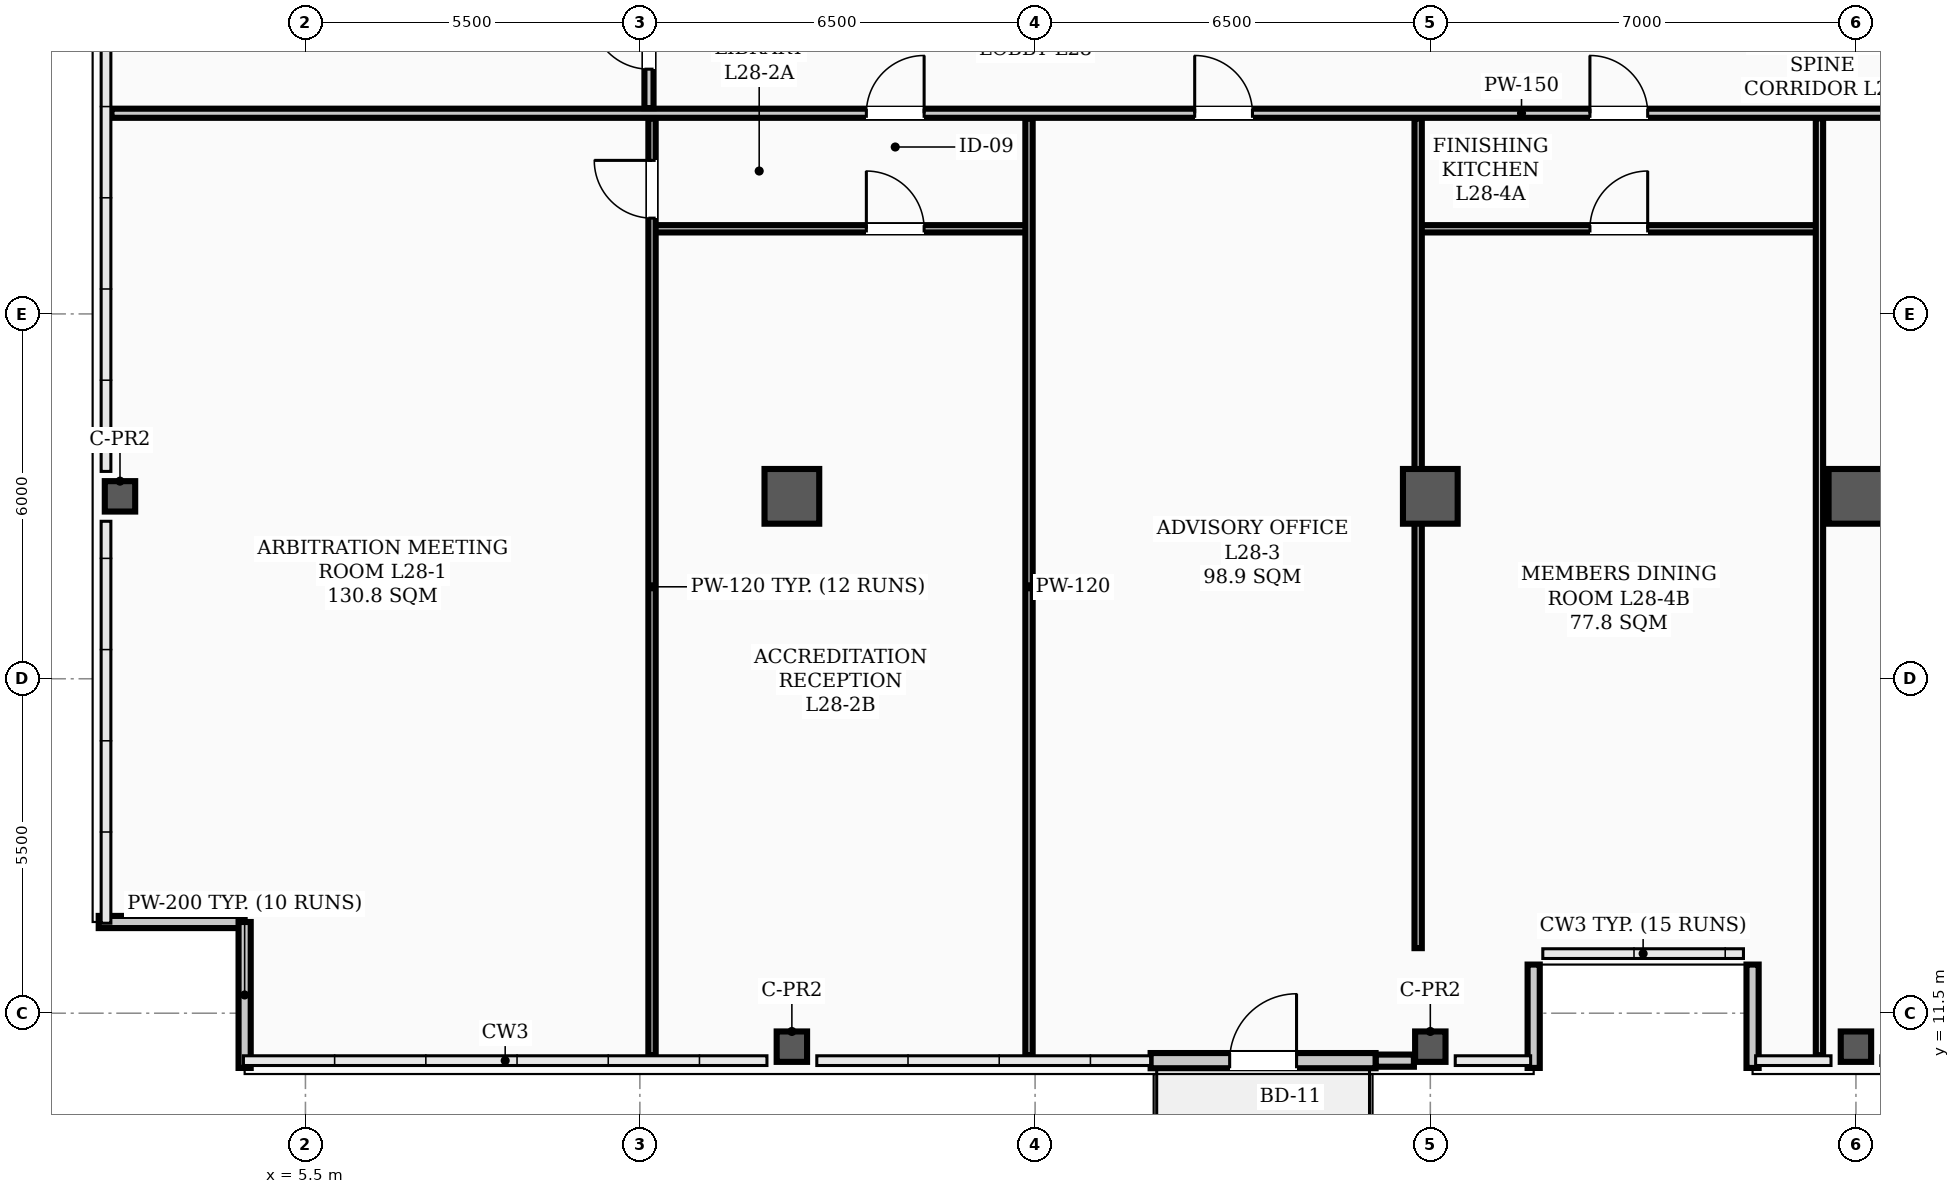
"""IFC4 building model, lengths in metres.
Left out: names, types, materials, properties, quantities, classifications, styles, units other than length and angle.
Written with IfcOpenShell. Run it as: python <this file> out.ifc"""

import sys

from ifc_helpers import new_model, si_unit, direction, frame, frame_2d, origin, origin_2d, place, context, subcontext, project, spatial, rectangle, hollow_rectangle, extrude, element, fill, save


model = new_model("IFC4")
c1 = context("Model", 3, precision=1e-05, world=origin(), true_north=direction((0.0, 1.0)))
c2 = subcontext(c1, "Body", "Model", "MODEL_VIEW")
j1 = project(units=[si_unit("LENGTHUNIT", "METRE"), si_unit("PLANEANGLEUNIT", "RADIAN")], contexts=[c1])
p1 = place(None, origin())
s1 = spatial("IfcSite", under=j1, at=p1, CompositionType="ELEMENT")
p2 = place(p1, origin())
s2 = spatial("IfcBuilding", under=s1, at=p2, CompositionType="ELEMENT")
p3 = place(p2, frame((0.0, 0.0, 114.9)))
s3 = spatial("IfcBuildingStorey", under=s2, at=p3, CompositionType="ELEMENT", Elevation=114.9)
for number, where, z_axis, x_axis in (
    (1, (13.5, 20.0, 0.0), (0.0, 0.0, 1.0), (1.0, 0.0, 0.0)),
    (2, (24.0, 20.0, 0.0), (0.0, 0.0, 1.0), (1.0, 0.0, 0.0)),
    (3, (31.0, 20.0, 0.0), (0.0, 0.0, 1.0), (1.0, 0.0, 0.0)),
):
    element("IfcColumn", number, at=place(p3, frame(where, z_axis=z_axis, x_axis=x_axis)), inside=s3, PredefinedType="COLUMN", context=c2, shape_type="SweptSolid", body=[
        extrude(hollow_rectangle(XDim=0.9, YDim=0.9, WallThickness=0.035, InnerFilletRadius=0.017, OuterFilletRadius=0.052, at=origin_2d()), origin(), (0.0, 0.0, 1.0), 3.9),
    ])
for number, where, z_axis, x_axis in (
    (4, (2.45, 20.0, 0.0), (0.0, 0.0, 1.0), (1.0, 0.0, 0.0)),
    (5, (13.5, 10.95, 0.0), (0.0, 0.0, 1.0), (1.0, 0.0, 0.0)),
    (6, (24.0, 10.95, 0.0), (0.0, 0.0, 1.0), (1.0, 0.0, 0.0)),
    (7, (31.0, 10.95, 0.0), (0.0, 0.0, 1.0), (1.0, 0.0, 0.0)),
):
    element("IfcColumn", number, at=place(p3, frame(where, z_axis=z_axis, x_axis=x_axis)), inside=s3, PredefinedType="COLUMN", context=c2, shape_type="SweptSolid", body=[
        extrude(hollow_rectangle(XDim=0.5, YDim=0.5, WallThickness=0.024, InnerFilletRadius=0.012, OuterFilletRadius=0.036, at=origin_2d()), origin(), (0.0, 0.0, 1.0), 3.9),
    ])
p4 = place(p3, frame((23.1, 10.72, 0.0), z_axis=(0.0, 0.0, 1.0), x_axis=(1.0, 0.0, 0.0)))
e8 = element("IfcWall", 8, at=p4, inside=s3, PredefinedType="PARAPET", context=c2, shape_type="SweptSolid", body=[
    extrude(rectangle(XDim=0.63, YDim=0.2, at=frame_2d((0.315, 0.0))), origin(), (0.0, 0.0, 1.0), 1.2),
])
for number, where, z_axis, x_axis in (
    (9, (2.1, 13.0, 0.0), (0.0, 0.0, 1.0), (1.0, 0.0, 0.0)),
    (10, (4.5, 13.0, 0.0), (0.0, 0.0, 1.0), (0.0, -1.0, 0.0)),
):
    element("IfcWall", number, at=place(p3, frame(where, z_axis=z_axis, x_axis=x_axis)), inside=s3, PredefinedType="PARAPET", context=c2, shape_type="SweptSolid", body=[
        extrude(rectangle(XDim=2.4, YDim=0.2, at=frame_2d((1.2, 0.0))), origin(), (0.0, 0.0, 1.0), 1.2),
    ])
for number, where, z_axis, x_axis in (
    (11, (25.7, 10.6, 0.0), (0.0, 0.0, 1.0), (0.0, 1.0, 0.0)),
    (12, (29.3, 12.3, 0.0), (0.0, 0.0, 1.0), (0.0, -1.0, 0.0)),
):
    element("IfcWall", number, at=place(p3, frame(where, z_axis=z_axis, x_axis=x_axis)), inside=s3, PredefinedType="PARAPET", context=c2, shape_type="SweptSolid", body=[
        extrude(rectangle(XDim=1.7, YDim=0.2, at=frame_2d((0.85, 0.0))), origin(), (0.0, 0.0, 1.0), 1.2),
    ])
p5 = place(p3, frame((19.4, 10.72, 0.0), z_axis=(0.0, 0.0, 1.0), x_axis=(1.0, 0.0, 0.0)))
e13 = element("IfcWall", 13, at=p5, inside=s3, PredefinedType="STANDARD", context=c2, shape_type="SweptSolid", body=[
    extrude(rectangle(XDim=3.7, YDim=0.25, at=frame_2d((1.85, 0.0))), origin(), (0.0, 0.0, 1.0), 3.18),
])
p6 = place(p5, frame((1.3, 0.0, 0.0)))
e14 = element("IfcOpeningElement", 14, at=p6, cuts=e13, PredefinedType="OPENING", context=c2, shape_type="SweptSolid", body=[
    extrude(rectangle(XDim=1.1, YDim=2.2, at=frame_2d((0.55, 1.1))), frame((0.0, 0.135, 0.0), z_axis=(0.0, -1.0, 0.0), x_axis=(1.0, 0.0, 0.0)), (0.0, 0.0, 1.0), 0.27),
])
p7 = place(p3, frame((2.31, 26.3, 0.0), z_axis=(0.0, 0.0, 1.0), x_axis=(1.0, 0.0, 0.0)))
e15 = element("IfcWall", 15, at=p7, inside=s3, PredefinedType="PARTITIONING", context=c2, shape_type="SweptSolid", body=[
    extrude(rectangle(XDim=46.38, YDim=0.15, at=frame_2d((23.19, 0.0))), origin(), (0.0, 0.0, 1.0), 3.1),
])
p8 = place(p7, frame((12.415, 0.0, 0.0)))
e16 = element("IfcOpeningElement", 16, at=p8, cuts=e15, PredefinedType="OPENING", context=c2, shape_type="SweptSolid", body=[
    extrude(rectangle(XDim=0.95, YDim=2.08, at=frame_2d((0.475, 1.04))), frame((0.0, 0.085, 0.0), z_axis=(0.0, -1.0, 0.0), x_axis=(1.0, 0.0, 0.0)), (0.0, 0.0, 1.0), 0.17),
])
p9 = place(p7, frame((17.815, 0.0, 0.0)))
e17 = element("IfcOpeningElement", 17, at=p9, cuts=e15, PredefinedType="OPENING", context=c2, shape_type="SweptSolid", body=[
    extrude(rectangle(XDim=0.95, YDim=2.08, at=frame_2d((0.475, 1.04))), frame((0.0, 0.085, 0.0), z_axis=(0.0, -1.0, 0.0), x_axis=(1.0, 0.0, 0.0)), (0.0, 0.0, 1.0), 0.17),
])
p10 = place(p7, frame((24.315, 0.0, 0.0)))
e18 = element("IfcOpeningElement", 18, at=p10, cuts=e15, PredefinedType="OPENING", context=c2, shape_type="SweptSolid", body=[
    extrude(rectangle(XDim=0.95, YDim=2.08, at=frame_2d((0.475, 1.04))), frame((0.0, 0.085, 0.0), z_axis=(0.0, -1.0, 0.0), x_axis=(1.0, 0.0, 0.0)), (0.0, 0.0, 1.0), 0.17),
])
p11 = place(p7, frame((30.915, 0.0, 0.0)))
e19 = element("IfcOpeningElement", 19, at=p11, cuts=e15, PredefinedType="OPENING", context=c2, shape_type="SweptSolid", body=[
    extrude(rectangle(XDim=0.95, YDim=2.08, at=frame_2d((0.475, 1.04))), frame((0.0, 0.085, 0.0), z_axis=(0.0, -1.0, 0.0), x_axis=(1.0, 0.0, 0.0)), (0.0, 0.0, 1.0), 0.17),
])
p12 = place(p7, frame((37.415, 0.0, 0.0)))
e20 = element("IfcOpeningElement", 20, at=p12, cuts=e15, PredefinedType="OPENING", context=c2, shape_type="SweptSolid", body=[
    extrude(rectangle(XDim=0.95, YDim=2.08, at=frame_2d((0.475, 1.04))), frame((0.0, 0.085, 0.0), z_axis=(0.0, -1.0, 0.0), x_axis=(1.0, 0.0, 0.0)), (0.0, 0.0, 1.0), 0.17),
])
p13 = place(p7, frame((43.26, 0.0, 0.0)))
e21 = element("IfcOpeningElement", 21, at=p13, cuts=e15, PredefinedType="OPENING", context=c2, shape_type="SweptSolid", body=[
    extrude(rectangle(XDim=0.95, YDim=2.08, at=frame_2d((0.475, 1.04))), frame((0.0, 0.085, 0.0), z_axis=(0.0, -1.0, 0.0), x_axis=(1.0, 0.0, 0.0)), (0.0, 0.0, 1.0), 0.17),
])
p14 = place(p3, frame((11.2, 24.4, 0.0), z_axis=(0.0, 0.0, 1.0), x_axis=(1.0, 0.0, 0.0)))
e22 = element("IfcWall", 22, at=p14, inside=s3, PredefinedType="PARTITIONING", context=c2, shape_type="SweptSolid", body=[
    extrude(rectangle(XDim=6.2, YDim=0.12, at=frame_2d((3.1, 0.0))), origin(), (0.0, 0.0, 1.0), 3.1),
])
p15 = place(p14, frame((3.525, 0.0, 0.0)))
e23 = element("IfcOpeningElement", 23, at=p15, cuts=e22, PredefinedType="OPENING", context=c2, shape_type="SweptSolid", body=[
    extrude(rectangle(XDim=0.95, YDim=2.08, at=frame_2d((0.475, 1.04))), frame((0.0, 0.07, 0.0), z_axis=(0.0, -1.0, 0.0), x_axis=(1.0, 0.0, 0.0)), (0.0, 0.0, 1.0), 0.14),
])
p16 = place(p3, frame((23.8, 24.4, 0.0), z_axis=(0.0, 0.0, 1.0), x_axis=(1.0, 0.0, 0.0)))
e24 = element("IfcWall", 24, at=p16, inside=s3, PredefinedType="PARTITIONING", context=c2, shape_type="SweptSolid", body=[
    extrude(rectangle(XDim=6.6, YDim=0.12, at=frame_2d((3.3, 0.0))), origin(), (0.0, 0.0, 1.0), 3.1),
])
p17 = place(p16, frame((2.825, 0.0, 0.0)))
e25 = element("IfcOpeningElement", 25, at=p17, cuts=e24, PredefinedType="OPENING", context=c2, shape_type="SweptSolid", body=[
    extrude(rectangle(XDim=0.95, YDim=2.08, at=frame_2d((0.475, 1.04))), frame((0.0, 0.07, 0.0), z_axis=(0.0, -1.0, 0.0), x_axis=(1.0, 0.0, 0.0)), (0.0, 0.0, 1.0), 0.14),
])
p18 = place(p3, frame((11.15, 26.385, 0.0), z_axis=(0.0, 0.0, 1.0), x_axis=(0.0, 1.0, 0.0)))
e26 = element("IfcWall", 26, at=p18, inside=s3, PredefinedType="PARTITIONING", context=c2, shape_type="SweptSolid", body=[
    extrude(rectangle(XDim=11.28, YDim=0.15, at=frame_2d((5.64, 0.0))), origin(), (0.0, 0.0, 1.0), 3.0),
])
p19 = place(p18, frame((0.64, 0.0, 0.0)))
e27 = element("IfcOpeningElement", 27, at=p19, cuts=e26, PredefinedType="OPENING", context=c2, shape_type="SweptSolid", body=[
    extrude(rectangle(XDim=0.95, YDim=2.08, at=frame_2d((0.475, 1.04))), frame((0.0, 0.085, 0.0), z_axis=(0.0, -1.0, 0.0), x_axis=(1.0, 0.0, 0.0)), (0.0, 0.0, 1.0), 0.17),
])
p20 = place(p18, frame((8.015, 0.0, 0.0)))
e28 = element("IfcOpeningElement", 28, at=p20, cuts=e26, PredefinedType="OPENING", context=c2, shape_type="SweptSolid", body=[
    extrude(rectangle(XDim=0.95, YDim=2.08, at=frame_2d((0.475, 1.04))), frame((0.0, 0.085, 0.0), z_axis=(0.0, -1.0, 0.0), x_axis=(1.0, 0.0, 0.0)), (0.0, 0.0, 1.0), 0.17),
])
p21 = place(p3, frame((11.2, 10.81, 0.0), z_axis=(0.0, 0.0, 1.0), x_axis=(0.0, 1.0, 0.0)))
e29 = element("IfcWall", 29, at=p21, inside=s3, PredefinedType="PARTITIONING", context=c2, shape_type="SweptSolid", body=[
    extrude(rectangle(XDim=15.405, YDim=0.12, at=frame_2d((7.703, 0.0))), origin(), (0.0, 0.0, 1.0), 3.0),
])
p22 = place(p21, frame((13.765, 0.0, 0.0)))
e30 = element("IfcOpeningElement", 30, at=p22, cuts=e29, PredefinedType="OPENING", context=c2, shape_type="SweptSolid", body=[
    extrude(rectangle(XDim=0.95, YDim=2.08, at=frame_2d((0.475, 1.04))), frame((0.0, 0.07, 0.0), z_axis=(0.0, -1.0, 0.0), x_axis=(1.0, 0.0, 0.0)), (0.0, 0.0, 1.0), 0.14),
])
p23 = place(p3, frame((17.4, 10.81, 0.0), z_axis=(0.0, 0.0, 1.0), x_axis=(0.0, 1.0, 0.0)))
e31 = element("IfcWall", 31, at=p23, inside=s3, PredefinedType="PARTITIONING", context=c2, shape_type="SweptSolid", body=[
    extrude(rectangle(XDim=15.405, YDim=0.12, at=frame_2d((7.703, 0.0))), origin(), (0.0, 0.0, 1.0), 3.0),
])
p24 = place(p3, frame((23.8, 12.57, 0.0), z_axis=(0.0, 0.0, 1.0), x_axis=(0.0, 1.0, 0.0)))
e32 = element("IfcWall", 32, at=p24, inside=s3, PredefinedType="PARTITIONING", context=c2, shape_type="SweptSolid", body=[
    extrude(rectangle(XDim=13.645, YDim=0.12, at=frame_2d((6.823, 0.0))), origin(), (0.0, 0.0, 1.0), 3.0),
])
p25 = place(p3, frame((30.4, 10.81, 0.0), z_axis=(0.0, 0.0, 1.0), x_axis=(0.0, 1.0, 0.0)))
e33 = element("IfcWall", 33, at=p25, inside=s3, PredefinedType="PARTITIONING", context=c2, shape_type="SweptSolid", body=[
    extrude(rectangle(XDim=15.405, YDim=0.12, at=frame_2d((7.703, 0.0))), origin(), (0.0, 0.0, 1.0), 3.0),
])
p26 = place(p6, origin())
e34 = element("IfcDoor", 34, at=p26, inside=s3, OperationType="SINGLE_SWING_RIGHT", PredefinedType="DOOR", context=c2, shape_type="SweptSolid", body=[
    extrude(rectangle(XDim=1.1, YDim=2.2, at=frame_2d((0.55, 1.1))), frame((0.0, 0.025, 0.0), z_axis=(0.0, -1.0, 0.0), x_axis=(1.0, 0.0, 0.0)), (0.0, 0.0, 1.0), 0.05),
])
fill(e14, e34)
p27 = place(p22, origin())
e35 = element("IfcDoor", 35, at=p27, inside=s3, OperationType="SINGLE_SWING_RIGHT", PredefinedType="DOOR", context=c2, shape_type="SweptSolid", body=[
    extrude(rectangle(XDim=0.95, YDim=2.08, at=frame_2d((0.475, 1.04))), frame((0.0, 0.025, 0.0), z_axis=(0.0, -1.0, 0.0), x_axis=(1.0, 0.0, 0.0)), (0.0, 0.0, 1.0), 0.05),
])
fill(e30, e35)
p28 = place(p15, origin())
e36 = element("IfcDoor", 36, at=p28, inside=s3, OperationType="SINGLE_SWING_LEFT", PredefinedType="DOOR", context=c2, shape_type="SweptSolid", body=[
    extrude(rectangle(XDim=0.95, YDim=2.08, at=frame_2d((0.475, 1.04))), frame((0.0, 0.025, 0.0), z_axis=(0.0, -1.0, 0.0), x_axis=(1.0, 0.0, 0.0)), (0.0, 0.0, 1.0), 0.05),
])
fill(e23, e36)
p29 = place(p8, origin())
e37 = element("IfcDoor", 37, at=p29, inside=s3, OperationType="SINGLE_SWING_RIGHT", PredefinedType="DOOR", context=c2, shape_type="SweptSolid", body=[
    extrude(rectangle(XDim=0.95, YDim=2.08, at=frame_2d((0.475, 1.04))), frame((0.0, 0.025, 0.0), z_axis=(0.0, -1.0, 0.0), x_axis=(1.0, 0.0, 0.0)), (0.0, 0.0, 1.0), 0.05),
])
fill(e16, e37)
p30 = place(p9, origin())
e38 = element("IfcDoor", 38, at=p30, inside=s3, OperationType="SINGLE_SWING_LEFT", PredefinedType="DOOR", context=c2, shape_type="SweptSolid", body=[
    extrude(rectangle(XDim=0.95, YDim=2.08, at=frame_2d((0.475, 1.04))), frame((0.0, 0.025, 0.0), z_axis=(0.0, -1.0, 0.0), x_axis=(1.0, 0.0, 0.0)), (0.0, 0.0, 1.0), 0.05),
])
fill(e17, e38)
p31 = place(p17, origin())
e39 = element("IfcDoor", 39, at=p31, inside=s3, OperationType="SINGLE_SWING_RIGHT", PredefinedType="DOOR", context=c2, shape_type="SweptSolid", body=[
    extrude(rectangle(XDim=0.95, YDim=2.08, at=frame_2d((0.475, 1.04))), frame((0.0, 0.025, 0.0), z_axis=(0.0, -1.0, 0.0), x_axis=(1.0, 0.0, 0.0)), (0.0, 0.0, 1.0), 0.05),
])
fill(e25, e39)
p32 = place(p10, origin())
e40 = element("IfcDoor", 40, at=p32, inside=s3, OperationType="SINGLE_SWING_LEFT", PredefinedType="DOOR", context=c2, shape_type="SweptSolid", body=[
    extrude(rectangle(XDim=0.95, YDim=2.08, at=frame_2d((0.475, 1.04))), frame((0.0, 0.025, 0.0), z_axis=(0.0, -1.0, 0.0), x_axis=(1.0, 0.0, 0.0)), (0.0, 0.0, 1.0), 0.05),
])
fill(e18, e40)
p33 = place(p19, origin())
e41 = element("IfcDoor", 41, at=p33, inside=s3, OperationType="SINGLE_SWING_RIGHT", PredefinedType="DOOR", context=c2, shape_type="SweptSolid", body=[
    extrude(rectangle(XDim=0.95, YDim=2.08, at=frame_2d((0.475, 1.04))), frame((0.0, 0.025, 0.0), z_axis=(0.0, -1.0, 0.0), x_axis=(1.0, 0.0, 0.0)), (0.0, 0.0, 1.0), 0.05),
])
fill(e27, e41)
save(model, sys.argv[1])
